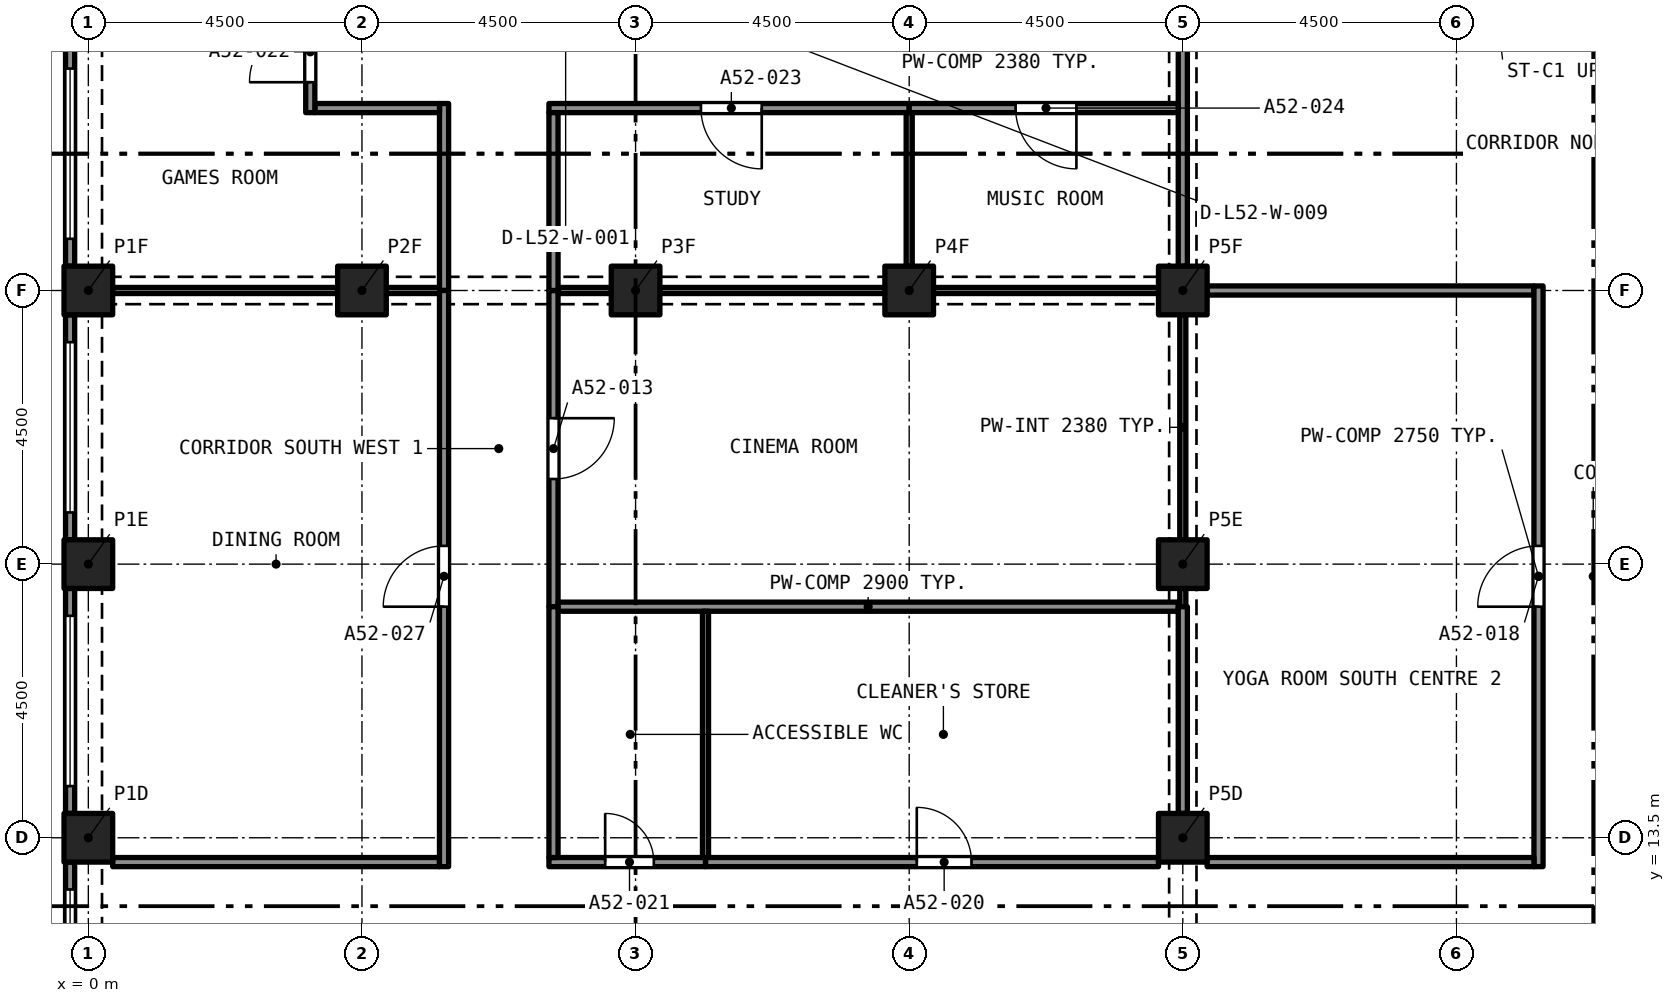
"""IFC4 building model, lengths in metres.
Left out: names, types, materials, properties, quantities, classifications, styles, units other than length and angle.
Written with IfcOpenShell. Run it as: python <this file> out.ifc"""

import sys

from ifc_helpers import new_model, si_unit, direction, frame, frame_2d, origin, origin_2d, place, context, subcontext, project, spatial, rectangle, extrude, element, fill, save


model = new_model("IFC4")
c1 = context("Model", 3, precision=1e-05, world=origin(), true_north=direction((0.0, 1.0)))
c2 = subcontext(c1, "Body", "Model", "MODEL_VIEW")
j1 = project(units=[si_unit("LENGTHUNIT", "METRE"), si_unit("PLANEANGLEUNIT", "RADIAN")], contexts=[c1])
p1 = place(None, origin())
s1 = spatial("IfcSite", under=j1, at=p1, CompositionType="ELEMENT")
p2 = place(p1, origin())
s2 = spatial("IfcBuilding", under=s1, at=p2, CompositionType="ELEMENT")
p3 = place(p2, frame((0.0, 0.0, 189.1)))
s3 = spatial("IfcBuildingStorey", under=s2, at=p3, CompositionType="ELEMENT", Elevation=189.1)
for number, where, z_axis, x_axis in (
    (1, (0.0, 13.5, 0.0), (0.0, 0.0, 1.0), (1.0, 0.0, 0.0)),
    (2, (18.0, 13.5, 0.0), (0.0, 0.0, 1.0), (1.0, 0.0, 0.0)),
    (3, (0.0, 18.0, 0.0), (0.0, 0.0, 1.0), (1.0, 0.0, 0.0)),
    (4, (18.0, 18.0, 0.0), (0.0, 0.0, 1.0), (1.0, 0.0, 0.0)),
    (5, (0.0, 22.5, 0.0), (0.0, 0.0, 1.0), (1.0, 0.0, 0.0)),
    (6, (4.5, 22.5, 0.0), (0.0, 0.0, 1.0), (1.0, 0.0, 0.0)),
    (7, (9.0, 22.5, 0.0), (0.0, 0.0, 1.0), (1.0, 0.0, 0.0)),
    (8, (13.5, 22.5, 0.0), (0.0, 0.0, 1.0), (1.0, 0.0, 0.0)),
    (9, (18.0, 22.5, 0.0), (0.0, 0.0, 1.0), (1.0, 0.0, 0.0)),
):
    element("IfcColumn", number, at=place(p3, frame(where, z_axis=z_axis, x_axis=x_axis)), inside=s3, PredefinedType="COLUMN", context=c2, shape_type="SweptSolid", body=[
        extrude(rectangle(XDim=0.8, YDim=0.8, at=origin_2d()), origin(), (0.0, 0.0, 1.0), 3.2),
    ])
p4 = place(p3, frame((-0.3, 22.9, 0.0), z_axis=(0.0, 0.0, 1.0), x_axis=(0.0, 1.0, 0.0)))
e10 = element("IfcWall", 10, at=p4, inside=s3, PredefinedType="SOLIDWALL", context=c2, shape_type="SweptSolid", body=[
    extrude(rectangle(XDim=3.7, YDim=0.15, at=frame_2d((1.85, 0.0))), origin(), (0.0, 0.0, 1.0), 3.2),
])
p5 = place(p4, frame((0.45, 0.0, 0.45)))
e11 = element("IfcOpeningElement", 11, at=p5, cuts=e10, PredefinedType="OPENING", context=c2, shape_type="SweptSolid", body=[
    extrude(rectangle(XDim=2.8, YDim=1.95, at=frame_2d((1.4, 0.975))), frame((0.0, 0.085, 0.0), z_axis=(0.0, -1.0, 0.0), x_axis=(1.0, 0.0, 0.0)), (0.0, 0.0, 1.0), 0.17),
])
p6 = place(p3, frame((-0.3, 18.4, 0.0), z_axis=(0.0, 0.0, 1.0), x_axis=(0.0, 1.0, 0.0)))
e12 = element("IfcWall", 12, at=p6, inside=s3, PredefinedType="SOLIDWALL", context=c2, shape_type="SweptSolid", body=[
    extrude(rectangle(XDim=3.7, YDim=0.15, at=frame_2d((1.85, 0.0))), origin(), (0.0, 0.0, 1.0), 3.2),
])
p7 = place(p6, frame((0.45, 0.0, 0.45)))
e13 = element("IfcOpeningElement", 13, at=p7, cuts=e12, PredefinedType="OPENING", context=c2, shape_type="SweptSolid", body=[
    extrude(rectangle(XDim=2.8, YDim=1.95, at=frame_2d((1.4, 0.975))), frame((0.0, 0.085, 0.0), z_axis=(0.0, -1.0, 0.0), x_axis=(1.0, 0.0, 0.0)), (0.0, 0.0, 1.0), 0.17),
])
p8 = place(p3, frame((-0.3, 13.9, 0.0), z_axis=(0.0, 0.0, 1.0), x_axis=(0.0, 1.0, 0.0)))
e14 = element("IfcWall", 14, at=p8, inside=s3, PredefinedType="SOLIDWALL", context=c2, shape_type="SweptSolid", body=[
    extrude(rectangle(XDim=3.7, YDim=0.15, at=frame_2d((1.85, 0.0))), origin(), (0.0, 0.0, 1.0), 3.2),
])
p9 = place(p8, frame((0.45, 0.0, 0.45)))
e15 = element("IfcOpeningElement", 15, at=p9, cuts=e14, PredefinedType="OPENING", context=c2, shape_type="SweptSolid", body=[
    extrude(rectangle(XDim=2.8, YDim=1.95, at=frame_2d((1.4, 0.975))), frame((0.0, 0.085, 0.0), z_axis=(0.0, -1.0, 0.0), x_axis=(1.0, 0.0, 0.0)), (0.0, 0.0, 1.0), 0.17),
])
p10 = place(p3, frame((-0.3, 9.4, 0.0), z_axis=(0.0, 0.0, 1.0), x_axis=(0.0, 1.0, 0.0)))
e16 = element("IfcWall", 16, at=p10, inside=s3, PredefinedType="SOLIDWALL", context=c2, shape_type="SweptSolid", body=[
    extrude(rectangle(XDim=3.7, YDim=0.15, at=frame_2d((1.85, 0.0))), origin(), (0.0, 0.0, 1.0), 3.2),
])
p11 = place(p10, frame((0.45, 0.0, 0.45)))
e17 = element("IfcOpeningElement", 17, at=p11, cuts=e16, PredefinedType="OPENING", context=c2, shape_type="SweptSolid", body=[
    extrude(rectangle(XDim=2.8, YDim=1.95, at=frame_2d((1.4, 0.975))), frame((0.0, 0.085, 0.0), z_axis=(0.0, -1.0, 0.0), x_axis=(1.0, 0.0, 0.0)), (0.0, 0.0, 1.0), 0.17),
])
p12 = place(p3, frame((18.0, 18.4, 0.0), z_axis=(0.0, 0.0, 1.0), x_axis=(0.0, 1.0, 0.0)))
e18 = element("IfcWall", 18, at=p12, inside=s3, PredefinedType="PARTITIONING", context=c2, shape_type="SweptSolid", body=[
    extrude(rectangle(XDim=3.7, YDim=0.1, at=frame_2d((1.85, 0.0))), origin(), (0.0, 0.0, 1.0), 2.38),
])
p13 = place(p3, frame((18.0, 17.3, 0.0), z_axis=(0.0, 0.0, 1.0), x_axis=(0.0, 1.0, 0.0)))
e19 = element("IfcWall", 19, at=p13, inside=s3, PredefinedType="PARTITIONING", context=c2, shape_type="SweptSolid", body=[
    extrude(rectangle(XDim=0.3, YDim=0.1, at=frame_2d((0.15, 0.0))), origin(), (0.0, 0.0, 1.0), 2.75),
])
p14 = place(p3, frame((7.65, 22.5, 0.0), z_axis=(0.0, 0.0, 1.0), x_axis=(0.0, -1.0, 0.0)))
e20 = element("IfcWall", 20, at=p14, inside=s3, PredefinedType="PARTITIONING", context=c2, shape_type="SweptSolid", body=[
    extrude(rectangle(XDim=5.2, YDim=0.15, at=frame_2d((2.6, 0.0))), origin(), (0.0, 0.0, 1.0), 2.9),
])
p15 = place(p14, frame((2.1, 0.0, 0.0)))
e21 = element("IfcOpeningElement", 21, at=p15, cuts=e20, PredefinedType="OPENING", context=c2, shape_type="SweptSolid", body=[
    extrude(rectangle(XDim=1.0, YDim=2.1, at=frame_2d((0.5, 1.05))), frame((0.0, 0.085, 0.0), z_axis=(0.0, -1.0, 0.0), x_axis=(1.0, 0.0, 0.0)), (0.0, 0.0, 1.0), 0.17),
])
p16 = place(p3, frame((7.725, 22.5, 0.0), z_axis=(0.0, 0.0, 1.0), x_axis=(1.0, 0.0, 0.0)))
e22 = element("IfcWall", 22, at=p16, inside=s3, PredefinedType="PARTITIONING", context=c2, shape_type="SweptSolid", body=[
    extrude(rectangle(XDim=0.875, YDim=0.1, at=frame_2d((0.438, 0.0))), origin(), (0.0, 0.0, 1.0), 2.38),
])
for number, where, z_axis, x_axis in (
    (23, (9.4, 22.5, 0.0), (0.0, 0.0, 1.0), (1.0, 0.0, 0.0)),
    (24, (13.9, 22.5, 0.0), (0.0, 0.0, 1.0), (1.0, 0.0, 0.0)),
):
    element("IfcWall", number, at=place(p3, frame(where, z_axis=z_axis, x_axis=x_axis)), inside=s3, PredefinedType="PARTITIONING", context=c2, shape_type="SweptSolid", body=[
        extrude(rectangle(XDim=3.7, YDim=0.1, at=frame_2d((1.85, 0.0))), origin(), (0.0, 0.0, 1.0), 2.38),
    ])
p17 = place(p3, frame((7.725, 17.3, 0.0), z_axis=(0.0, 0.0, 1.0), x_axis=(1.0, 0.0, 0.0)))
e25 = element("IfcWall", 25, at=p17, inside=s3, PredefinedType="PARTITIONING", context=c2, shape_type="SweptSolid", body=[
    extrude(rectangle(XDim=10.2, YDim=0.15, at=frame_2d((5.1, 0.0))), origin(), (0.0, 0.0, 1.0), 2.9),
])
p18 = place(p3, frame((18.4, 22.5, 0.0), z_axis=(0.0, 0.0, 1.0), x_axis=(1.0, 0.0, 0.0)))
e26 = element("IfcWall", 26, at=p18, inside=s3, PredefinedType="PARTITIONING", context=c2, shape_type="SweptSolid", body=[
    extrude(rectangle(XDim=5.375, YDim=0.15, at=frame_2d((2.688, 0.0))), origin(), (0.0, 0.0, 1.0), 2.75),
])
p19 = place(p3, frame((18.0, 22.9, 0.0), z_axis=(0.0, 0.0, 1.0), x_axis=(0.0, 1.0, 0.0)))
e27 = element("IfcWall", 27, at=p19, inside=s3, PredefinedType="PARTITIONING", context=c2, shape_type="SweptSolid", body=[
    extrude(rectangle(XDim=3.7, YDim=0.15, at=frame_2d((1.85, 0.0))), origin(), (0.0, 0.0, 1.0), 2.38),
])
p20 = place(p3, frame((23.85, 13.025, 0.0), z_axis=(0.0, 0.0, 1.0), x_axis=(0.0, 1.0, 0.0)))
e28 = element("IfcWall", 28, at=p20, inside=s3, PredefinedType="PARTITIONING", context=c2, shape_type="SweptSolid", body=[
    extrude(rectangle(XDim=9.55, YDim=0.15, at=frame_2d((4.775, 0.0))), origin(), (0.0, 0.0, 1.0), 2.75),
])
p21 = place(p20, frame((4.275, 0.0, 0.0)))
e29 = element("IfcOpeningElement", 29, at=p21, cuts=e28, PredefinedType="OPENING", context=c2, shape_type="SweptSolid", body=[
    extrude(rectangle(XDim=1.0, YDim=2.1, at=frame_2d((0.5, 1.05))), frame((0.0, 0.085, 0.0), z_axis=(0.0, -1.0, 0.0), x_axis=(1.0, 0.0, 0.0)), (0.0, 0.0, 1.0), 0.17),
])
p22 = place(p3, frame((18.4, 13.1, 0.0), z_axis=(0.0, 0.0, 1.0), x_axis=(1.0, 0.0, 0.0)))
e30 = element("IfcWall", 30, at=p22, inside=s3, PredefinedType="PARTITIONING", context=c2, shape_type="SweptSolid", body=[
    extrude(rectangle(XDim=5.375, YDim=0.15, at=frame_2d((2.688, 0.0))), origin(), (0.0, 0.0, 1.0), 2.75),
])
p23 = place(p3, frame((10.15, 13.1, 0.0), z_axis=(0.0, 0.0, 1.0), x_axis=(1.0, 0.0, 0.0)))
e31 = element("IfcWall", 31, at=p23, inside=s3, PredefinedType="PARTITIONING", context=c2, shape_type="SweptSolid", body=[
    extrude(rectangle(XDim=7.45, YDim=0.15, at=frame_2d((3.725, 0.0))), origin(), (0.0, 0.0, 1.0), 2.9),
])
p24 = place(p23, frame((3.475, 0.0, 0.0)))
e32 = element("IfcOpeningElement", 32, at=p24, cuts=e31, PredefinedType="OPENING", context=c2, shape_type="SweptSolid", body=[
    extrude(rectangle(XDim=0.9, YDim=2.1, at=frame_2d((0.45, 1.05))), frame((0.0, 0.085, 0.0), z_axis=(0.0, -1.0, 0.0), x_axis=(1.0, 0.0, 0.0)), (0.0, 0.0, 1.0), 0.17),
])
p25 = place(p3, frame((7.575, 13.1, 0.0), z_axis=(0.0, 0.0, 1.0), x_axis=(1.0, 0.0, 0.0)))
e33 = element("IfcWall", 33, at=p25, inside=s3, PredefinedType="PARTITIONING", context=c2, shape_type="SweptSolid", body=[
    extrude(rectangle(XDim=2.575, YDim=0.15, at=frame_2d((1.288, 0.0))), origin(), (0.0, 0.0, 1.0), 2.9),
])
p26 = place(p25, frame((0.925, 0.0, 0.0)))
e34 = element("IfcOpeningElement", 34, at=p26, cuts=e33, PredefinedType="OPENING", context=c2, shape_type="SweptSolid", body=[
    extrude(rectangle(XDim=0.8, YDim=2.1, at=frame_2d((0.4, 1.05))), frame((0.0, 0.085, 0.0), z_axis=(0.0, -1.0, 0.0), x_axis=(1.0, 0.0, 0.0)), (0.0, 0.0, 1.0), 0.17),
])
p27 = place(p3, frame((0.4, 13.1, 0.0), z_axis=(0.0, 0.0, 1.0), x_axis=(1.0, 0.0, 0.0)))
e35 = element("IfcWall", 35, at=p27, inside=s3, PredefinedType="PARTITIONING", context=c2, shape_type="SweptSolid", body=[
    extrude(rectangle(XDim=5.375, YDim=0.15, at=frame_2d((2.688, 0.0))), origin(), (0.0, 0.0, 1.0), 2.9),
])
p28 = place(p3, frame((18.0, 13.9, 0.0), z_axis=(0.0, 0.0, 1.0), x_axis=(0.0, 1.0, 0.0)))
e36 = element("IfcWall", 36, at=p28, inside=s3, PredefinedType="PARTITIONING", context=c2, shape_type="SweptSolid", body=[
    extrude(rectangle(XDim=3.4, YDim=0.15, at=frame_2d((1.7, 0.0))), origin(), (0.0, 0.0, 1.0), 2.38),
])
p29 = place(p3, frame((5.85, 22.5, 0.0), z_axis=(0.0, 0.0, 1.0), x_axis=(0.0, 1.0, 0.0)))
e37 = element("IfcWall", 37, at=p29, inside=s3, PredefinedType="PARTITIONING", context=c2, shape_type="SweptSolid", body=[
    extrude(rectangle(XDim=3.075, YDim=0.15, at=frame_2d((1.538, 0.0))), origin(), (0.0, 0.0, 1.0), 2.9),
])
p30 = place(p3, frame((3.725, 25.5, 0.0), z_axis=(0.0, 0.0, 1.0), x_axis=(1.0, 0.0, 0.0)))
e38 = element("IfcWall", 38, at=p30, inside=s3, PredefinedType="PARTITIONING", context=c2, shape_type="SweptSolid", body=[
    extrude(rectangle(XDim=2.05, YDim=0.15, at=frame_2d((1.025, 0.0))), origin(), (0.0, 0.0, 1.0), 2.9),
])
p31 = place(p3, frame((3.65, 25.425, 0.0), z_axis=(0.0, 0.0, 1.0), x_axis=(0.0, 1.0, 0.0)))
e39 = element("IfcWall", 39, at=p31, inside=s3, PredefinedType="PARTITIONING", context=c2, shape_type="SweptSolid", body=[
    extrude(rectangle(XDim=1.925, YDim=0.15, at=frame_2d((0.962, 0.0))), origin(), (0.0, 0.0, 1.0), 2.9),
])
p32 = place(p31, frame((0.5, 0.0, 0.0)))
e40 = element("IfcOpeningElement", 40, at=p32, cuts=e39, PredefinedType="OPENING", context=c2, shape_type="SweptSolid", body=[
    extrude(rectangle(XDim=1.0, YDim=2.1, at=frame_2d((0.5, 1.05))), frame((0.0, 0.085, 0.0), z_axis=(0.0, -1.0, 0.0), x_axis=(1.0, 0.0, 0.0)), (0.0, 0.0, 1.0), 0.17),
])
p33 = place(p3, frame((13.5, 25.5, 0.0), z_axis=(0.0, 0.0, 1.0), x_axis=(-1.0, 0.0, 0.0)))
e41 = element("IfcWall", 41, at=p33, inside=s3, PredefinedType="PARTITIONING", context=c2, shape_type="SweptSolid", body=[
    extrude(rectangle(XDim=5.925, YDim=0.15, at=frame_2d((2.962, 0.0))), origin(), (0.0, 0.0, 1.0), 2.9),
])
p34 = place(p33, frame((2.425, 0.0, 0.0)))
e42 = element("IfcOpeningElement", 42, at=p34, cuts=e41, PredefinedType="OPENING", context=c2, shape_type="SweptSolid", body=[
    extrude(rectangle(XDim=1.0, YDim=2.1, at=frame_2d((0.5, 1.05))), frame((0.0, 0.085, 0.0), z_axis=(0.0, -1.0, 0.0), x_axis=(1.0, 0.0, 0.0)), (0.0, 0.0, 1.0), 0.17),
])
p35 = place(p3, frame((7.65, 22.5, 0.0), z_axis=(0.0, 0.0, 1.0), x_axis=(0.0, 1.0, 0.0)))
e43 = element("IfcWall", 43, at=p35, inside=s3, PredefinedType="PARTITIONING", context=c2, shape_type="SweptSolid", body=[
    extrude(rectangle(XDim=2.925, YDim=0.15, at=frame_2d((1.462, 0.0))), origin(), (0.0, 0.0, 1.0), 2.9),
])
p36 = place(p3, frame((17.925, 25.5, 0.0), z_axis=(0.0, 0.0, 1.0), x_axis=(-1.0, 0.0, 0.0)))
e44 = element("IfcWall", 44, at=p36, inside=s3, PredefinedType="PARTITIONING", context=c2, shape_type="SweptSolid", body=[
    extrude(rectangle(XDim=4.425, YDim=0.15, at=frame_2d((2.212, 0.0))), origin(), (0.0, 0.0, 1.0), 2.9),
])
p37 = place(p36, frame((1.675, 0.0, 0.0)))
e45 = element("IfcOpeningElement", 45, at=p37, cuts=e44, PredefinedType="OPENING", context=c2, shape_type="SweptSolid", body=[
    extrude(rectangle(XDim=1.0, YDim=2.1, at=frame_2d((0.5, 1.05))), frame((0.0, 0.085, 0.0), z_axis=(0.0, -1.0, 0.0), x_axis=(1.0, 0.0, 0.0)), (0.0, 0.0, 1.0), 0.17),
])
p38 = place(p3, frame((7.65, 13.175, 0.0), z_axis=(0.0, 0.0, 1.0), x_axis=(0.0, 1.0, 0.0)))
e46 = element("IfcWall", 46, at=p38, inside=s3, PredefinedType="PARTITIONING", context=c2, shape_type="SweptSolid", body=[
    extrude(rectangle(XDim=4.125, YDim=0.15, at=frame_2d((2.062, 0.0))), origin(), (0.0, 0.0, 1.0), 2.9),
])
p39 = place(p3, frame((5.85, 13.025, 0.0), z_axis=(0.0, 0.0, 1.0), x_axis=(0.0, 1.0, 0.0)))
e47 = element("IfcWall", 47, at=p39, inside=s3, PredefinedType="PARTITIONING", context=c2, shape_type="SweptSolid", body=[
    extrude(rectangle(XDim=9.475, YDim=0.15, at=frame_2d((4.738, 0.0))), origin(), (0.0, 0.0, 1.0), 2.9),
])
p40 = place(p39, frame((4.275, 0.0, 0.0)))
e48 = element("IfcOpeningElement", 48, at=p40, cuts=e47, PredefinedType="OPENING", context=c2, shape_type="SweptSolid", body=[
    extrude(rectangle(XDim=1.0, YDim=2.1, at=frame_2d((0.5, 1.05))), frame((0.0, 0.085, 0.0), z_axis=(0.0, -1.0, 0.0), x_axis=(1.0, 0.0, 0.0)), (0.0, 0.0, 1.0), 0.17),
])
p41 = place(p3, frame((4.9, 22.5, 0.0), z_axis=(0.0, 0.0, 1.0), x_axis=(1.0, 0.0, 0.0)))
e49 = element("IfcWall", 49, at=p41, inside=s3, PredefinedType="PARTITIONING", context=c2, shape_type="SweptSolid", body=[
    extrude(rectangle(XDim=0.875, YDim=0.1, at=frame_2d((0.438, 0.0))), origin(), (0.0, 0.0, 1.0), 2.38),
])
p42 = place(p3, frame((0.4, 22.5, 0.0), z_axis=(0.0, 0.0, 1.0), x_axis=(1.0, 0.0, 0.0)))
e50 = element("IfcWall", 50, at=p42, inside=s3, PredefinedType="PARTITIONING", context=c2, shape_type="SweptSolid", body=[
    extrude(rectangle(XDim=3.7, YDim=0.1, at=frame_2d((1.85, 0.0))), origin(), (0.0, 0.0, 1.0), 2.38),
])
p43 = place(p3, frame((13.5, 22.9, 0.0), z_axis=(0.0, 0.0, 1.0), x_axis=(0.0, 1.0, 0.0)))
e51 = element("IfcWall", 51, at=p43, inside=s3, PredefinedType="PARTITIONING", context=c2, shape_type="SweptSolid", body=[
    extrude(rectangle(XDim=2.525, YDim=0.1, at=frame_2d((1.263, 0.0))), origin(), (0.0, 0.0, 1.0), 2.9),
])
p44 = place(p3, frame((10.15, 13.175, 0.0), z_axis=(0.0, 0.0, 1.0), x_axis=(0.0, 1.0, 0.0)))
e52 = element("IfcWall", 52, at=p44, inside=s3, PredefinedType="PARTITIONING", context=c2, shape_type="SweptSolid", body=[
    extrude(rectangle(XDim=4.05, YDim=0.1, at=frame_2d((2.025, 0.0))), origin(), (0.0, 0.0, 1.0), 2.9),
])
p45 = place(p5, origin())
e53 = element("IfcWindow", 53, at=p45, inside=s3, PartitioningType="SINGLE_PANEL", PredefinedType="WINDOW", context=c2, shape_type="SweptSolid", body=[
    extrude(rectangle(XDim=2.8, YDim=1.95, at=frame_2d((1.4, 0.975))), frame((0.0, 0.03, 0.0), z_axis=(0.0, -1.0, 0.0), x_axis=(1.0, 0.0, 0.0)), (0.0, 0.0, 1.0), 0.06),
])
fill(e11, e53)
p46 = place(p7, origin())
e54 = element("IfcWindow", 54, at=p46, inside=s3, PartitioningType="SINGLE_PANEL", PredefinedType="WINDOW", context=c2, shape_type="SweptSolid", body=[
    extrude(rectangle(XDim=2.8, YDim=1.95, at=frame_2d((1.4, 0.975))), frame((0.0, 0.03, 0.0), z_axis=(0.0, -1.0, 0.0), x_axis=(1.0, 0.0, 0.0)), (0.0, 0.0, 1.0), 0.06),
])
fill(e13, e54)
p47 = place(p9, origin())
e55 = element("IfcWindow", 55, at=p47, inside=s3, PartitioningType="SINGLE_PANEL", PredefinedType="WINDOW", context=c2, shape_type="SweptSolid", body=[
    extrude(rectangle(XDim=2.8, YDim=1.95, at=frame_2d((1.4, 0.975))), frame((0.0, 0.03, 0.0), z_axis=(0.0, -1.0, 0.0), x_axis=(1.0, 0.0, 0.0)), (0.0, 0.0, 1.0), 0.06),
])
fill(e15, e55)
p48 = place(p11, origin())
e56 = element("IfcWindow", 56, at=p48, inside=s3, PartitioningType="SINGLE_PANEL", PredefinedType="WINDOW", context=c2, shape_type="SweptSolid", body=[
    extrude(rectangle(XDim=2.8, YDim=1.95, at=frame_2d((1.4, 0.975))), frame((0.0, 0.03, 0.0), z_axis=(0.0, -1.0, 0.0), x_axis=(1.0, 0.0, 0.0)), (0.0, 0.0, 1.0), 0.06),
])
fill(e17, e56)
p49 = place(p15, origin())
e57 = element("IfcDoor", 57, at=p49, inside=s3, OperationType="SINGLE_SWING_RIGHT", PredefinedType="DOOR", context=c2, shape_type="SweptSolid", body=[
    extrude(rectangle(XDim=1.0, YDim=2.1, at=frame_2d((0.5, 1.05))), frame((0.0, 0.025, 0.0), z_axis=(0.0, -1.0, 0.0), x_axis=(1.0, 0.0, 0.0)), (0.0, 0.0, 1.0), 0.05),
])
fill(e21, e57)
p50 = place(p21, origin())
e58 = element("IfcDoor", 58, at=p50, inside=s3, OperationType="SINGLE_SWING_RIGHT", PredefinedType="DOOR", context=c2, shape_type="SweptSolid", body=[
    extrude(rectangle(XDim=1.0, YDim=2.1, at=frame_2d((0.5, 1.05))), frame((0.0, 0.025, 0.0), z_axis=(0.0, -1.0, 0.0), x_axis=(1.0, 0.0, 0.0)), (0.0, 0.0, 1.0), 0.05),
])
fill(e29, e58)
p51 = place(p24, origin())
e59 = element("IfcDoor", 59, at=p51, inside=s3, OperationType="SINGLE_SWING_RIGHT", PredefinedType="DOOR", context=c2, shape_type="SweptSolid", body=[
    extrude(rectangle(XDim=0.9, YDim=2.1, at=frame_2d((0.45, 1.05))), frame((0.0, 0.025, 0.0), z_axis=(0.0, -1.0, 0.0), x_axis=(1.0, 0.0, 0.0)), (0.0, 0.0, 1.0), 0.05),
])
fill(e32, e59)
p52 = place(p26, origin())
e60 = element("IfcDoor", 60, at=p52, inside=s3, OperationType="SINGLE_SWING_RIGHT", PredefinedType="DOOR", context=c2, shape_type="SweptSolid", body=[
    extrude(rectangle(XDim=0.8, YDim=2.1, at=frame_2d((0.4, 1.05))), frame((0.0, 0.025, 0.0), z_axis=(0.0, -1.0, 0.0), x_axis=(1.0, 0.0, 0.0)), (0.0, 0.0, 1.0), 0.05),
])
fill(e34, e60)
p53 = place(p32, origin())
e61 = element("IfcDoor", 61, at=p53, inside=s3, OperationType="SINGLE_SWING_RIGHT", PredefinedType="DOOR", context=c2, shape_type="SweptSolid", body=[
    extrude(rectangle(XDim=1.0, YDim=2.1, at=frame_2d((0.5, 1.05))), frame((0.0, 0.025, 0.0), z_axis=(0.0, -1.0, 0.0), x_axis=(1.0, 0.0, 0.0)), (0.0, 0.0, 1.0), 0.05),
])
fill(e40, e61)
p54 = place(p34, origin())
e62 = element("IfcDoor", 62, at=p54, inside=s3, OperationType="SINGLE_SWING_LEFT", PredefinedType="DOOR", context=c2, shape_type="SweptSolid", body=[
    extrude(rectangle(XDim=1.0, YDim=2.1, at=frame_2d((0.5, 1.05))), frame((0.0, 0.025, 0.0), z_axis=(0.0, -1.0, 0.0), x_axis=(1.0, 0.0, 0.0)), (0.0, 0.0, 1.0), 0.05),
])
fill(e42, e62)
p55 = place(p37, origin())
e63 = element("IfcDoor", 63, at=p55, inside=s3, OperationType="SINGLE_SWING_LEFT", PredefinedType="DOOR", context=c2, shape_type="SweptSolid", body=[
    extrude(rectangle(XDim=1.0, YDim=2.1, at=frame_2d((0.5, 1.05))), frame((0.0, 0.025, 0.0), z_axis=(0.0, -1.0, 0.0), x_axis=(1.0, 0.0, 0.0)), (0.0, 0.0, 1.0), 0.05),
])
fill(e45, e63)
p56 = place(p40, origin())
e64 = element("IfcDoor", 64, at=p56, inside=s3, OperationType="SINGLE_SWING_RIGHT", PredefinedType="DOOR", context=c2, shape_type="SweptSolid", body=[
    extrude(rectangle(XDim=1.0, YDim=2.1, at=frame_2d((0.5, 1.05))), frame((0.0, 0.025, 0.0), z_axis=(0.0, -1.0, 0.0), x_axis=(1.0, 0.0, 0.0)), (0.0, 0.0, 1.0), 0.05),
])
fill(e48, e64)
save(model, sys.argv[1])
